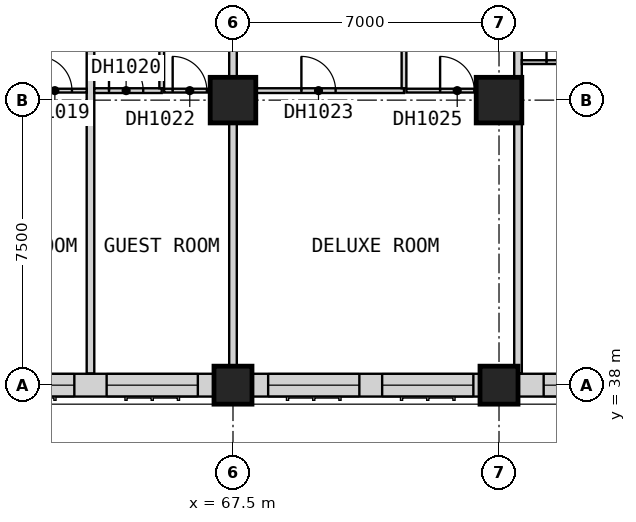
"""IFC4 building model, lengths in metres.
Left out: names, types, materials, properties, quantities, classifications, styles, units other than length and angle.
Written with IfcOpenShell. Run it as: python <this file> out.ifc"""

import sys

from ifc_helpers import new_model, si_unit, direction, frame, frame_2d, origin, origin_2d, place, context, subcontext, project, spatial, rectangle, extrude, element, fill, save


model = new_model("IFC4")
c1 = context("Model", 3, precision=1e-05, world=origin(), true_north=direction((0.0, 1.0)))
c2 = subcontext(c1, "Body", "Model", "MODEL_VIEW")
j1 = project(units=[si_unit("LENGTHUNIT", "METRE"), si_unit("PLANEANGLEUNIT", "RADIAN")], contexts=[c1])
p1 = place(None, origin())
s1 = spatial("IfcSite", under=j1, at=p1, CompositionType="ELEMENT")
p2 = place(p1, origin())
s2 = spatial("IfcBuilding", under=s1, at=p2, CompositionType="ELEMENT")
p3 = place(p2, frame((0.0, 0.0, 48.4)))
s3 = spatial("IfcBuildingStorey", under=s2, at=p3, CompositionType="ELEMENT", Elevation=48.4)
p4 = place(p3, frame((67.5, 38.0, 0.0), z_axis=(0.0, 0.0, 1.0), x_axis=(1.0, 0.0, 0.0)))
e1 = element("IfcColumn", 1, at=p4, inside=s3, PredefinedType="COLUMN", context=c2, shape_type="SweptSolid", body=[
    extrude(rectangle(XDim=1.0, YDim=1.0, at=origin_2d()), origin(), (0.0, 0.0, 1.0), 3.6),
])
p5 = place(p3, frame((67.5, 45.5, 0.0), z_axis=(0.0, 0.0, 1.0), x_axis=(1.0, 0.0, 0.0)))
e2 = element("IfcColumn", 2, at=p5, inside=s3, PredefinedType="COLUMN", context=c2, shape_type="SweptSolid", body=[
    extrude(rectangle(XDim=1.2, YDim=1.2, at=origin_2d()), origin(), (0.0, 0.0, 1.0), 3.6),
])
p6 = place(p3, frame((74.5, 38.0, 0.0), z_axis=(0.0, 0.0, 1.0), x_axis=(1.0, 0.0, 0.0)))
e3 = element("IfcColumn", 3, at=p6, inside=s3, PredefinedType="COLUMN", context=c2, shape_type="SweptSolid", body=[
    extrude(rectangle(XDim=1.0, YDim=1.0, at=origin_2d()), origin(), (0.0, 0.0, 1.0), 3.6),
])
p7 = place(p3, frame((74.5, 45.5, 0.0), z_axis=(0.0, 0.0, 1.0), x_axis=(1.0, 0.0, 0.0)))
e4 = element("IfcColumn", 4, at=p7, inside=s3, PredefinedType="COLUMN", context=c2, shape_type="SweptSolid", body=[
    extrude(rectangle(XDim=1.2, YDim=1.2, at=origin_2d()), origin(), (0.0, 0.0, 1.0), 3.6),
])
p8 = place(p3, frame((60.5, 38.0, 0.0), z_axis=(0.0, 0.0, 1.0), x_axis=(1.0, 0.0, 0.0)))
e5 = element("IfcWall", 5, at=p8, inside=s3, PredefinedType="SOLIDWALL", context=c2, shape_type="SweptSolid", body=[
    extrude(rectangle(XDim=6.5, YDim=0.6, at=frame_2d((3.25, 0.0))), origin(), (0.0, 0.0, 1.0), 2.85),
])
p9 = place(p8, frame((0.425, 0.0, 0.8)))
e6 = element("IfcOpeningElement", 6, at=p9, cuts=e5, PredefinedType="OPENING", context=c2, shape_type="SweptSolid", body=[
    extrude(rectangle(XDim=2.4, YDim=1.8, at=frame_2d((1.2, 0.9))), frame((0.0, 0.31, 0.0), z_axis=(0.0, -1.0, 0.0), x_axis=(1.0, 0.0, 0.0)), (0.0, 0.0, 1.0), 0.62),
])
p10 = place(p8, frame((3.675, 0.0, 0.8)))
e7 = element("IfcOpeningElement", 7, at=p10, cuts=e5, PredefinedType="OPENING", context=c2, shape_type="SweptSolid", body=[
    extrude(rectangle(XDim=2.4, YDim=1.8, at=frame_2d((1.2, 0.9))), frame((0.0, 0.31, 0.0), z_axis=(0.0, -1.0, 0.0), x_axis=(1.0, 0.0, 0.0)), (0.0, 0.0, 1.0), 0.62),
])
p11 = place(p3, frame((68.0, 38.0, 0.0), z_axis=(0.0, 0.0, 1.0), x_axis=(1.0, 0.0, 0.0)))
e8 = element("IfcWall", 8, at=p11, inside=s3, PredefinedType="SOLIDWALL", context=c2, shape_type="SweptSolid", body=[
    extrude(rectangle(XDim=6.0, YDim=0.6, at=frame_2d((3.0, 0.0))), origin(), (0.0, 0.0, 1.0), 2.85),
])
p12 = place(p11, frame((0.425, 0.0, 0.8)))
e9 = element("IfcOpeningElement", 9, at=p12, cuts=e8, PredefinedType="OPENING", context=c2, shape_type="SweptSolid", body=[
    extrude(rectangle(XDim=2.4, YDim=1.8, at=frame_2d((1.2, 0.9))), frame((0.0, 0.31, 0.0), z_axis=(0.0, -1.0, 0.0), x_axis=(1.0, 0.0, 0.0)), (0.0, 0.0, 1.0), 0.62),
])
p13 = place(p11, frame((3.425, 0.0, 0.8)))
e10 = element("IfcOpeningElement", 10, at=p13, cuts=e8, PredefinedType="OPENING", context=c2, shape_type="SweptSolid", body=[
    extrude(rectangle(XDim=2.4, YDim=1.8, at=frame_2d((1.2, 0.9))), frame((0.0, 0.31, 0.0), z_axis=(0.0, -1.0, 0.0), x_axis=(1.0, 0.0, 0.0)), (0.0, 0.0, 1.0), 0.62),
])
p14 = place(p3, frame((75.0, 38.0, 0.0), z_axis=(0.0, 0.0, 1.0), x_axis=(1.0, 0.0, 0.0)))
e11 = element("IfcWall", 11, at=p14, inside=s3, PredefinedType="SOLIDWALL", context=c2, shape_type="SweptSolid", body=[
    extrude(rectangle(XDim=6.5, YDim=0.6, at=frame_2d((3.25, 0.0))), origin(), (0.0, 0.0, 1.0), 2.85),
])
p15 = place(p14, frame((0.675, 0.0, 0.8)))
e12 = element("IfcOpeningElement", 12, at=p15, cuts=e11, PredefinedType="OPENING", context=c2, shape_type="SweptSolid", body=[
    extrude(rectangle(XDim=2.4, YDim=1.8, at=frame_2d((1.2, 0.9))), frame((0.0, 0.31, 0.0), z_axis=(0.0, -1.0, 0.0), x_axis=(1.0, 0.0, 0.0)), (0.0, 0.0, 1.0), 0.62),
])
p16 = place(p14, frame((3.925, 0.0, 0.8)))
e13 = element("IfcOpeningElement", 13, at=p16, cuts=e11, PredefinedType="OPENING", context=c2, shape_type="SweptSolid", body=[
    extrude(rectangle(XDim=2.4, YDim=1.8, at=frame_2d((1.2, 0.9))), frame((0.0, 0.31, 0.0), z_axis=(0.0, -1.0, 0.0), x_axis=(1.0, 0.0, 0.0)), (0.0, 0.0, 1.0), 0.62),
])
p17 = place(p3, frame((63.75, 38.31, 0.0), z_axis=(0.0, 0.0, 1.0), x_axis=(0.0, 1.0, 0.0)))
e14 = element("IfcWall", 14, at=p17, inside=s3, PredefinedType="PARTITIONING", context=c2, shape_type="SweptSolid", body=[
    extrude(rectangle(XDim=11.715, YDim=0.2, at=frame_2d((5.857, 0.0))), origin(), (0.0, 0.0, 1.0), 3.35),
])
p18 = place(p3, frame((67.5, 37.5, 0.0), z_axis=(0.0, 0.0, 1.0), x_axis=(0.0, 1.0, 0.0)))
e15 = element("IfcWall", 15, at=p18, inside=s3, PredefinedType="PARTITIONING", context=c2, shape_type="SweptSolid", body=[
    extrude(rectangle(XDim=12.525, YDim=0.2, at=frame_2d((6.262, 0.0))), origin(), (0.0, 0.0, 1.0), 3.35),
])
p19 = place(p3, frame((75.0, 38.31, 0.0), z_axis=(0.0, 0.0, 1.0), x_axis=(0.0, 1.0, 0.0)))
e16 = element("IfcWall", 16, at=p19, inside=s3, PredefinedType="PARTITIONING", context=c2, shape_type="SweptSolid", body=[
    extrude(rectangle(XDim=11.715, YDim=0.2, at=frame_2d((5.857, 0.0))), origin(), (0.0, 0.0, 1.0), 3.35),
])
p20 = place(p3, frame((61.938, 45.75, 0.0), z_axis=(0.0, 0.0, 1.0), x_axis=(1.0, 0.0, 0.0)))
e17 = element("IfcWall", 17, at=p20, inside=s3, PredefinedType="PARTITIONING", context=c2, shape_type="SweptSolid", body=[
    extrude(rectangle(XDim=1.712, YDim=0.1, at=frame_2d((0.856, 0.0))), origin(), (0.0, 0.0, 1.0), 3.35),
])
p21 = place(p20, frame((0.425, 0.0, 0.0)))
e18 = element("IfcOpeningElement", 18, at=p21, cuts=e17, PredefinedType="OPENING", context=c2, shape_type="SweptSolid", body=[
    extrude(rectangle(XDim=0.9, YDim=2.1, at=frame_2d((0.45, 1.05))), frame((0.0, 0.06, 0.0), z_axis=(0.0, -1.0, 0.0), x_axis=(1.0, 0.0, 0.0)), (0.0, 0.0, 1.0), 0.12),
])
p22 = place(p3, frame((65.688, 45.75, 0.0), z_axis=(0.0, 0.0, 1.0), x_axis=(1.0, 0.0, 0.0)))
e19 = element("IfcWall", 19, at=p22, inside=s3, PredefinedType="PARTITIONING", context=c2, shape_type="SweptSolid", body=[
    extrude(rectangle(XDim=1.712, YDim=0.1, at=frame_2d((0.856, 0.0))), origin(), (0.0, 0.0, 1.0), 3.35),
])
p23 = place(p22, frame((0.225, 0.0, 0.0)))
e20 = element("IfcOpeningElement", 20, at=p23, cuts=e19, PredefinedType="OPENING", context=c2, shape_type="SweptSolid", body=[
    extrude(rectangle(XDim=0.9, YDim=2.1, at=frame_2d((0.45, 1.05))), frame((0.0, 0.06, 0.0), z_axis=(0.0, -1.0, 0.0), x_axis=(1.0, 0.0, 0.0)), (0.0, 0.0, 1.0), 0.12),
])
p24 = place(p3, frame((72.062, 45.75, 0.0), z_axis=(0.0, 0.0, 1.0), x_axis=(1.0, 0.0, 0.0)))
e21 = element("IfcWall", 21, at=p24, inside=s3, PredefinedType="PARTITIONING", context=c2, shape_type="SweptSolid", body=[
    extrude(rectangle(XDim=2.837, YDim=0.1, at=frame_2d((1.419, 0.0))), origin(), (0.0, 0.0, 1.0), 3.35),
])
p25 = place(p24, frame((0.887, 0.0, 0.0)))
e22 = element("IfcOpeningElement", 22, at=p25, cuts=e21, PredefinedType="OPENING", context=c2, shape_type="SweptSolid", body=[
    extrude(rectangle(XDim=0.9, YDim=2.1, at=frame_2d((0.45, 1.05))), frame((0.0, 0.06, 0.0), z_axis=(0.0, -1.0, 0.0), x_axis=(1.0, 0.0, 0.0)), (0.0, 0.0, 1.0), 0.12),
])
p26 = place(p3, frame((75.1, 46.5, 0.0), z_axis=(0.0, 0.0, 1.0), x_axis=(1.0, 0.0, 0.0)))
e23 = element("IfcWall", 23, at=p26, inside=s3, PredefinedType="PARTITIONING", context=c2, shape_type="SweptSolid", body=[
    extrude(rectangle(XDim=7.35, YDim=0.1, at=frame_2d((3.675, 0.0))), origin(), (0.0, 0.0, 1.0), 3.35),
])
p27 = place(p26, frame((0.65, 0.0, 0.0)))
e24 = element("IfcOpeningElement", 24, at=p27, cuts=e23, PredefinedType="OPENING", context=c2, shape_type="SweptSolid", body=[
    extrude(rectangle(XDim=0.9, YDim=2.1, at=frame_2d((0.45, 1.05))), frame((0.0, 0.06, 0.0), z_axis=(0.0, -1.0, 0.0), x_axis=(1.0, 0.0, 0.0)), (0.0, 0.0, 1.0), 0.12),
])
p28 = place(p3, frame((63.85, 45.75, 0.0), z_axis=(0.0, 0.0, 1.0), x_axis=(1.0, 0.0, 0.0)))
e25 = element("IfcWall", 25, at=p28, inside=s3, PredefinedType="PARTITIONING", context=c2, shape_type="SweptSolid", body=[
    extrude(rectangle(XDim=1.775, YDim=0.125, at=frame_2d((0.887, 0.0))), origin(), (0.0, 0.0, 1.0), 3.35),
])
p29 = place(p28, frame((0.387, 0.0, 0.0)))
e26 = element("IfcOpeningElement", 26, at=p29, cuts=e25, PredefinedType="OPENING", context=c2, shape_type="SweptSolid", body=[
    extrude(rectangle(XDim=0.9, YDim=2.1, at=frame_2d((0.45, 1.05))), frame((0.0, 0.073, 0.0), z_axis=(0.0, -1.0, 0.0), x_axis=(1.0, 0.0, 0.0)), (0.0, 0.0, 1.0), 0.145),
])
p30 = place(p3, frame((67.6, 45.75, 0.0), z_axis=(0.0, 0.0, 1.0), x_axis=(1.0, 0.0, 0.0)))
e27 = element("IfcWall", 27, at=p30, inside=s3, PredefinedType="PARTITIONING", context=c2, shape_type="SweptSolid", body=[
    extrude(rectangle(XDim=4.4, YDim=0.125, at=frame_2d((2.2, 0.0))), origin(), (0.0, 0.0, 1.0), 3.35),
])
p31 = place(p30, frame((1.7, 0.0, 0.0)))
e28 = element("IfcOpeningElement", 28, at=p31, cuts=e27, PredefinedType="OPENING", context=c2, shape_type="SweptSolid", body=[
    extrude(rectangle(XDim=0.9, YDim=2.1, at=frame_2d((0.45, 1.05))), frame((0.0, 0.073, 0.0), z_axis=(0.0, -1.0, 0.0), x_axis=(1.0, 0.0, 0.0)), (0.0, 0.0, 1.0), 0.145),
])
for number, where, z_axis, x_axis in (
    (29, (65.625, 45.812, 0.0), (0.0, 0.0, 1.0), (0.0, 1.0, 0.0)),
    (30, (72.0, 45.812, 0.0), (0.0, 0.0, 1.0), (0.0, 1.0, 0.0)),
):
    element("IfcWall", number, at=place(p3, frame(where, z_axis=z_axis, x_axis=x_axis)), inside=s3, PredefinedType="PARTITIONING", context=c2, shape_type="SweptSolid", body=[
        extrude(rectangle(XDim=4.212, YDim=0.125, at=frame_2d((2.106, 0.0))), origin(), (0.0, 0.0, 1.0), 3.35),
    ])
p32 = place(p9, origin())
e31 = element("IfcWindow", 31, at=p32, inside=s3, PartitioningType="SINGLE_PANEL", PredefinedType="WINDOW", context=c2, shape_type="SweptSolid", body=[
    extrude(rectangle(XDim=2.4, YDim=1.8, at=frame_2d((1.2, 0.9))), frame((0.0, -0.07, 0.0), z_axis=(0.0, -1.0, 0.0), x_axis=(1.0, 0.0, 0.0)), (0.0, 0.0, 1.0), 0.06),
])
fill(e6, e31)
p33 = place(p10, origin())
e32 = element("IfcWindow", 32, at=p33, inside=s3, PartitioningType="SINGLE_PANEL", PredefinedType="WINDOW", context=c2, shape_type="SweptSolid", body=[
    extrude(rectangle(XDim=2.4, YDim=1.8, at=frame_2d((1.2, 0.9))), frame((0.0, -0.07, 0.0), z_axis=(0.0, -1.0, 0.0), x_axis=(1.0, 0.0, 0.0)), (0.0, 0.0, 1.0), 0.06),
])
fill(e7, e32)
p34 = place(p12, origin())
e33 = element("IfcWindow", 33, at=p34, inside=s3, PartitioningType="SINGLE_PANEL", PredefinedType="WINDOW", context=c2, shape_type="SweptSolid", body=[
    extrude(rectangle(XDim=2.4, YDim=1.8, at=frame_2d((1.2, 0.9))), frame((0.0, -0.07, 0.0), z_axis=(0.0, -1.0, 0.0), x_axis=(1.0, 0.0, 0.0)), (0.0, 0.0, 1.0), 0.06),
])
fill(e9, e33)
p35 = place(p13, origin())
e34 = element("IfcWindow", 34, at=p35, inside=s3, PartitioningType="SINGLE_PANEL", PredefinedType="WINDOW", context=c2, shape_type="SweptSolid", body=[
    extrude(rectangle(XDim=2.4, YDim=1.8, at=frame_2d((1.2, 0.9))), frame((0.0, -0.07, 0.0), z_axis=(0.0, -1.0, 0.0), x_axis=(1.0, 0.0, 0.0)), (0.0, 0.0, 1.0), 0.06),
])
fill(e10, e34)
p36 = place(p15, origin())
e35 = element("IfcWindow", 35, at=p36, inside=s3, PartitioningType="SINGLE_PANEL", PredefinedType="WINDOW", context=c2, shape_type="SweptSolid", body=[
    extrude(rectangle(XDim=2.4, YDim=1.8, at=frame_2d((1.2, 0.9))), frame((0.0, -0.07, 0.0), z_axis=(0.0, -1.0, 0.0), x_axis=(1.0, 0.0, 0.0)), (0.0, 0.0, 1.0), 0.06),
])
fill(e12, e35)
p37 = place(p21, origin())
e36 = element("IfcDoor", 36, at=p37, inside=s3, OperationType="SINGLE_SWING_LEFT", PredefinedType="DOOR", context=c2, shape_type="SweptSolid", body=[
    extrude(rectangle(XDim=0.9, YDim=2.1, at=frame_2d((0.45, 1.05))), frame((0.0, 0.025, 0.0), z_axis=(0.0, -1.0, 0.0), x_axis=(1.0, 0.0, 0.0)), (0.0, 0.0, 1.0), 0.05),
])
fill(e18, e36)
p38 = place(p29, origin())
e37 = element("IfcDoor", 37, at=p38, inside=s3, OperationType="SINGLE_SWING_LEFT", PredefinedType="DOOR", context=c2, shape_type="SweptSolid", body=[
    extrude(rectangle(XDim=0.9, YDim=2.1, at=frame_2d((0.45, 1.05))), frame((0.0, 0.025, 0.0), z_axis=(0.0, -1.0, 0.0), x_axis=(1.0, 0.0, 0.0)), (0.0, 0.0, 1.0), 0.05),
])
fill(e26, e37)
p39 = place(p23, origin())
e38 = element("IfcDoor", 38, at=p39, inside=s3, OperationType="SINGLE_SWING_LEFT", PredefinedType="DOOR", context=c2, shape_type="SweptSolid", body=[
    extrude(rectangle(XDim=0.9, YDim=2.1, at=frame_2d((0.45, 1.05))), frame((0.0, 0.025, 0.0), z_axis=(0.0, -1.0, 0.0), x_axis=(1.0, 0.0, 0.0)), (0.0, 0.0, 1.0), 0.05),
])
fill(e20, e38)
p40 = place(p31, origin())
e39 = element("IfcDoor", 39, at=p40, inside=s3, OperationType="SINGLE_SWING_LEFT", PredefinedType="DOOR", context=c2, shape_type="SweptSolid", body=[
    extrude(rectangle(XDim=0.9, YDim=2.1, at=frame_2d((0.45, 1.05))), frame((0.0, 0.025, 0.0), z_axis=(0.0, -1.0, 0.0), x_axis=(1.0, 0.0, 0.0)), (0.0, 0.0, 1.0), 0.05),
])
fill(e28, e39)
p41 = place(p25, origin())
e40 = element("IfcDoor", 40, at=p41, inside=s3, OperationType="SINGLE_SWING_LEFT", PredefinedType="DOOR", context=c2, shape_type="SweptSolid", body=[
    extrude(rectangle(XDim=0.9, YDim=2.1, at=frame_2d((0.45, 1.05))), frame((0.0, 0.025, 0.0), z_axis=(0.0, -1.0, 0.0), x_axis=(1.0, 0.0, 0.0)), (0.0, 0.0, 1.0), 0.05),
])
fill(e22, e40)
p42 = place(p27, origin())
e41 = element("IfcDoor", 41, at=p42, inside=s3, OperationType="SINGLE_SWING_RIGHT", PredefinedType="DOOR", context=c2, shape_type="SweptSolid", body=[
    extrude(rectangle(XDim=0.9, YDim=2.1, at=frame_2d((0.45, 1.05))), frame((0.0, 0.025, 0.0), z_axis=(0.0, -1.0, 0.0), x_axis=(1.0, 0.0, 0.0)), (0.0, 0.0, 1.0), 0.05),
])
fill(e24, e41)
save(model, sys.argv[1])
